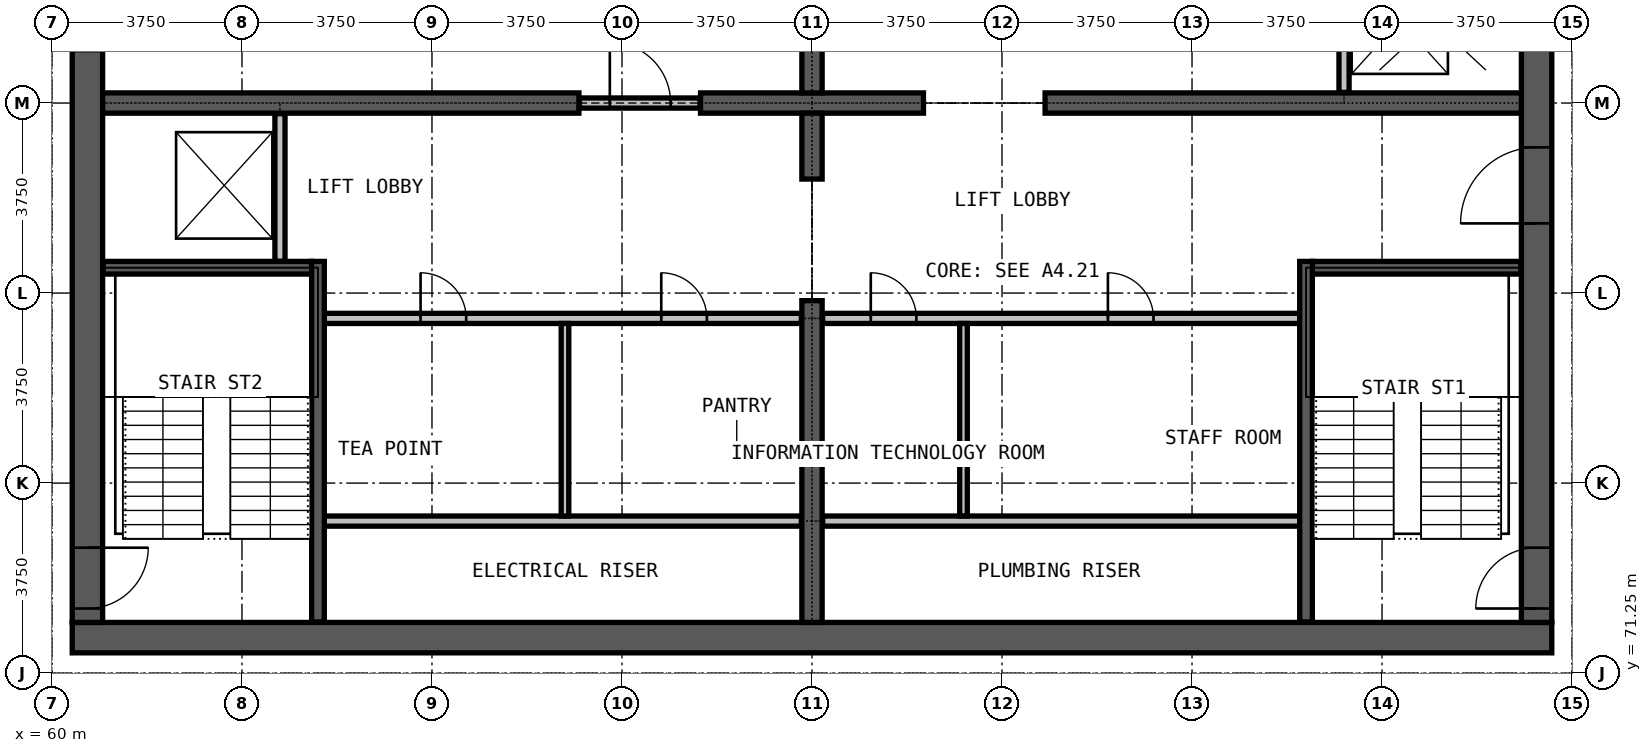
"""IFC4 building model, lengths in metres.
Left out: names, types, materials, properties, quantities, classifications, styles, units other than length and angle.
Written with IfcOpenShell. Run it as: python <this file> out.ifc"""

import sys

from ifc_helpers import new_model, si_unit, direction, frame, frame_2d, origin, place, context, subcontext, project, spatial, rectangle, extrude, element, fill, save


model = new_model("IFC4")
c1 = context("Model", 3, precision=1e-05, world=origin(), true_north=direction((0.0, 1.0)))
c2 = subcontext(c1, "Body", "Model", "MODEL_VIEW")
j1 = project(units=[si_unit("LENGTHUNIT", "METRE"), si_unit("PLANEANGLEUNIT", "RADIAN")], contexts=[c1])
p1 = place(None, origin())
s1 = spatial("IfcSite", under=j1, at=p1, CompositionType="ELEMENT")
p2 = place(p1, origin())
s2 = spatial("IfcBuilding", under=s1, at=p2, CompositionType="ELEMENT")
p3 = place(p2, frame((0.0, 0.0, 217.5)))
s3 = spatial("IfcBuildingStorey", under=s2, at=p3, CompositionType="ELEMENT", Elevation=217.5)
p4 = place(p3, frame((60.4, 71.95, 0.0), z_axis=(0.0, 0.0, 1.0), x_axis=(1.0, 0.0, 0.0)))
e1 = element("IfcWall", 1, at=p4, inside=s3, PredefinedType="SHEAR", context=c2, shape_type="SweptSolid", body=[
    extrude(rectangle(XDim=29.2, YDim=0.6, at=frame_2d((14.6, 0.0))), origin(), (0.0, 0.0, 1.0), 3.6),
])
p5 = place(p3, frame((89.3, 72.25, 0.0), z_axis=(0.0, 0.0, 1.0), x_axis=(0.0, 1.0, 0.0)))
e2 = element("IfcWall", 2, at=p5, inside=s3, PredefinedType="SHEAR", context=c2, shape_type="SweptSolid", body=[
    extrude(rectangle(XDim=20.5, YDim=0.6, at=frame_2d((10.25, 0.0))), origin(), (0.0, 0.0, 1.0), 3.6),
])
p6 = place(p5, frame((0.275, 0.0, 0.0)))
e3 = element("IfcOpeningElement", 3, at=p6, cuts=e2, PredefinedType="OPENING", context=c2, shape_type="SweptSolid", body=[
    extrude(rectangle(XDim=1.2, YDim=2.2, at=frame_2d((0.6, 1.1))), frame((0.0, 0.31, 0.0), z_axis=(0.0, -1.0, 0.0), x_axis=(1.0, 0.0, 0.0)), (0.0, 0.0, 1.0), 0.62),
])
p7 = place(p5, frame((13.775, 0.0, 0.0)))
e4 = element("IfcOpeningElement", 4, at=p7, cuts=e2, PredefinedType="OPENING", context=c2, shape_type="SweptSolid", body=[
    extrude(rectangle(XDim=1.2, YDim=2.2, at=frame_2d((0.6, 1.1))), frame((0.0, 0.31, 0.0), z_axis=(0.0, -1.0, 0.0), x_axis=(1.0, 0.0, 0.0)), (0.0, 0.0, 1.0), 0.62),
])
p8 = place(p5, frame((7.875, 0.0, 0.0)))
e5 = element("IfcOpeningElement", 5, at=p8, cuts=e2, PredefinedType="OPENING", context=c2, shape_type="SweptSolid", body=[
    extrude(rectangle(XDim=1.5, YDim=2.2, at=frame_2d((0.75, 1.1))), frame((0.0, 0.31, 0.0), z_axis=(0.0, -1.0, 0.0), x_axis=(1.0, 0.0, 0.0)), (0.0, 0.0, 1.0), 0.62),
])
p9 = place(p3, frame((60.7, 92.75, 0.0), z_axis=(0.0, 0.0, 1.0), x_axis=(0.0, -1.0, 0.0)))
e6 = element("IfcWall", 6, at=p9, inside=s3, PredefinedType="SHEAR", context=c2, shape_type="SweptSolid", body=[
    extrude(rectangle(XDim=20.5, YDim=0.6, at=frame_2d((10.25, 0.0))), origin(), (0.0, 0.0, 1.0), 3.6),
])
p10 = place(p9, frame((19.025, 0.0, 0.0)))
e7 = element("IfcOpeningElement", 7, at=p10, cuts=e6, PredefinedType="OPENING", context=c2, shape_type="SweptSolid", body=[
    extrude(rectangle(XDim=1.2, YDim=2.2, at=frame_2d((0.6, 1.1))), frame((0.0, 0.31, 0.0), z_axis=(0.0, -1.0, 0.0), x_axis=(1.0, 0.0, 0.0)), (0.0, 0.0, 1.0), 0.62),
])
p11 = place(p9, frame((8.025, 0.0, 0.0)))
e8 = element("IfcOpeningElement", 8, at=p11, cuts=e6, PredefinedType="OPENING", context=c2, shape_type="SweptSolid", body=[
    extrude(rectangle(XDim=1.2, YDim=2.2, at=frame_2d((0.6, 1.1))), frame((0.0, 0.31, 0.0), z_axis=(0.0, -1.0, 0.0), x_axis=(1.0, 0.0, 0.0)), (0.0, 0.0, 1.0), 0.62),
])
p12 = place(p3, frame((61.0, 82.5, 0.0), z_axis=(0.0, 0.0, 1.0), x_axis=(1.0, 0.0, 0.0)))
e9 = element("IfcWall", 9, at=p12, inside=s3, PredefinedType="SHEAR", context=c2, shape_type="SweptSolid", body=[
    extrude(rectangle(XDim=9.4, YDim=0.4, at=frame_2d((4.7, 0.0))), origin(), (0.0, 0.0, 1.0), 3.6),
])
p13 = place(p3, frame((72.8, 82.5, 0.0), z_axis=(0.0, 0.0, 1.0), x_axis=(1.0, 0.0, 0.0)))
e10 = element("IfcWall", 10, at=p13, inside=s3, PredefinedType="SHEAR", context=c2, shape_type="SweptSolid", body=[
    extrude(rectangle(XDim=4.4, YDim=0.4, at=frame_2d((2.2, 0.0))), origin(), (0.0, 0.0, 1.0), 3.6),
])
p14 = place(p3, frame((79.6, 82.5, 0.0), z_axis=(0.0, 0.0, 1.0), x_axis=(1.0, 0.0, 0.0)))
e11 = element("IfcWall", 11, at=p14, inside=s3, PredefinedType="SHEAR", context=c2, shape_type="SweptSolid", body=[
    extrude(rectangle(XDim=9.4, YDim=0.4, at=frame_2d((4.7, 0.0))), origin(), (0.0, 0.0, 1.0), 3.6),
])
p15 = place(p3, frame((75.0, 72.25, 0.0), z_axis=(0.0, 0.0, 1.0), x_axis=(0.0, 1.0, 0.0)))
e12 = element("IfcWall", 12, at=p15, inside=s3, PredefinedType="SHEAR", context=c2, shape_type="SweptSolid", body=[
    extrude(rectangle(XDim=6.35, YDim=0.4, at=frame_2d((3.175, 0.0))), origin(), (0.0, 0.0, 1.0), 3.6),
])
for number, where, z_axis, x_axis in (
    (13, (75.0, 81.0, 0.0), (0.0, 0.0, 1.0), (0.0, 1.0, 0.0)),
    (14, (75.0, 82.7, 0.0), (0.0, 0.0, 1.0), (0.0, 1.0, 0.0)),
):
    element("IfcWall", number, at=place(p3, frame(where, z_axis=z_axis, x_axis=x_axis)), inside=s3, PredefinedType="SHEAR", context=c2, shape_type="SweptSolid", body=[
        extrude(rectangle(XDim=1.3, YDim=0.4, at=frame_2d((0.65, 0.0))), origin(), (0.0, 0.0, 1.0), 3.6),
    ])
for number, where, z_axis, x_axis in (
    (15, (65.375, 74.25, 0.0), (0.0, 0.0, 1.0), (1.0, 0.0, 0.0)),
    (16, (75.21, 74.25, 0.0), (0.0, 0.0, 1.0), (1.0, 0.0, 0.0)),
):
    element("IfcWall", number, at=place(p3, frame(where, z_axis=z_axis, x_axis=x_axis)), inside=s3, PredefinedType="PARTITIONING", context=c2, shape_type="SweptSolid", body=[
        extrude(rectangle(XDim=9.415, YDim=0.2, at=frame_2d((4.708, 0.0))), origin(), (0.0, 0.0, 1.0), 3.3),
    ])
p16 = place(p3, frame((65.375, 78.25, 0.0), z_axis=(0.0, 0.0, 1.0), x_axis=(1.0, 0.0, 0.0)))
e17 = element("IfcWall", 17, at=p16, inside=s3, PredefinedType="PARTITIONING", context=c2, shape_type="SweptSolid", body=[
    extrude(rectangle(XDim=9.415, YDim=0.2, at=frame_2d((4.708, 0.0))), origin(), (0.0, 0.0, 1.0), 3.3),
])
p17 = place(p16, frame((1.9, 0.0, 0.0)))
e18 = element("IfcOpeningElement", 18, at=p17, cuts=e17, PredefinedType="OPENING", context=c2, shape_type="SweptSolid", body=[
    extrude(rectangle(XDim=0.9, YDim=2.2, at=frame_2d((0.45, 1.1))), frame((0.0, 0.11, 0.0), z_axis=(0.0, -1.0, 0.0), x_axis=(1.0, 0.0, 0.0)), (0.0, 0.0, 1.0), 0.22),
])
p18 = place(p16, frame((6.65, 0.0, 0.0)))
e19 = element("IfcOpeningElement", 19, at=p18, cuts=e17, PredefinedType="OPENING", context=c2, shape_type="SweptSolid", body=[
    extrude(rectangle(XDim=0.9, YDim=2.2, at=frame_2d((0.45, 1.1))), frame((0.0, 0.11, 0.0), z_axis=(0.0, -1.0, 0.0), x_axis=(1.0, 0.0, 0.0)), (0.0, 0.0, 1.0), 0.22),
])
p19 = place(p3, frame((75.21, 78.25, 0.0), z_axis=(0.0, 0.0, 1.0), x_axis=(1.0, 0.0, 0.0)))
e20 = element("IfcWall", 20, at=p19, inside=s3, PredefinedType="PARTITIONING", context=c2, shape_type="SweptSolid", body=[
    extrude(rectangle(XDim=9.415, YDim=0.2, at=frame_2d((4.708, 0.0))), origin(), (0.0, 0.0, 1.0), 3.3),
])
p20 = place(p19, frame((0.95, 0.0, 0.0)))
e21 = element("IfcOpeningElement", 21, at=p20, cuts=e20, PredefinedType="OPENING", context=c2, shape_type="SweptSolid", body=[
    extrude(rectangle(XDim=0.9, YDim=2.2, at=frame_2d((0.45, 1.1))), frame((0.0, 0.11, 0.0), z_axis=(0.0, -1.0, 0.0), x_axis=(1.0, 0.0, 0.0)), (0.0, 0.0, 1.0), 0.22),
])
p21 = place(p19, frame((5.63, 0.0, 0.0)))
e22 = element("IfcOpeningElement", 22, at=p21, cuts=e20, PredefinedType="OPENING", context=c2, shape_type="SweptSolid", body=[
    extrude(rectangle(XDim=0.9, YDim=2.2, at=frame_2d((0.45, 1.1))), frame((0.0, 0.11, 0.0), z_axis=(0.0, -1.0, 0.0), x_axis=(1.0, 0.0, 0.0)), (0.0, 0.0, 1.0), 0.22),
])
p22 = place(p3, frame((70.41, 82.5, 0.0), z_axis=(0.0, 0.0, 1.0), x_axis=(1.0, 0.0, 0.0)))
e23 = element("IfcWall", 23, at=p22, inside=s3, PredefinedType="PARTITIONING", context=c2, shape_type="SweptSolid", body=[
    extrude(rectangle(XDim=2.38, YDim=0.2, at=frame_2d((1.19, 0.0))), origin(), (0.0, 0.0, 1.0), 2.4),
])
p23 = place(p22, frame((0.6, 0.0, 0.0)))
e24 = element("IfcOpeningElement", 24, at=p23, cuts=e23, PredefinedType="OPENING", context=c2, shape_type="SweptSolid", body=[
    extrude(rectangle(XDim=1.2, YDim=2.2, at=frame_2d((0.6, 1.1))), frame((0.0, 0.11, 0.0), z_axis=(0.0, -1.0, 0.0), x_axis=(1.0, 0.0, 0.0)), (0.0, 0.0, 1.0), 0.22),
])
for number, where, z_axis, x_axis in (
    (25, (70.125, 74.35, 0.0), (0.0, 0.0, 1.0), (0.0, 1.0, 0.0)),
    (26, (77.99, 74.35, 0.0), (0.0, 0.0, 1.0), (0.0, 1.0, 0.0)),
):
    element("IfcWall", number, at=place(p3, frame(where, z_axis=z_axis, x_axis=x_axis)), inside=s3, PredefinedType="PARTITIONING", context=c2, shape_type="SweptSolid", body=[
        extrude(rectangle(XDim=3.8, YDim=0.15, at=frame_2d((1.9, 0.0))), origin(), (0.0, 0.0, 1.0), 3.3),
    ])
p24 = place(p3, frame((64.5, 79.375, 0.0), z_axis=(0.0, 0.0, 1.0), x_axis=(0.0, 1.0, 0.0)))
e27 = element("IfcWall", 27, at=p24, inside=s3, PredefinedType="PARTITIONING", context=c2, shape_type="SweptSolid", body=[
    extrude(rectangle(XDim=2.915, YDim=0.2, at=frame_2d((1.458, 0.0))), origin(), (0.0, 0.0, 1.0), 3.3),
])
p25 = place(p3, frame((85.5, 82.71, 0.0), z_axis=(0.0, 0.0, 1.0), x_axis=(0.0, 1.0, 0.0)))
e28 = element("IfcWall", 28, at=p25, inside=s3, PredefinedType="PARTITIONING", context=c2, shape_type="SweptSolid", body=[
    extrude(rectangle(XDim=2.915, YDim=0.2, at=frame_2d((1.458, 0.0))), origin(), (0.0, 0.0, 1.0), 3.3),
])
p26 = place(p25, frame((0.9, 0.0, 0.0)))
e29 = element("IfcOpeningElement", 29, at=p26, cuts=e28, PredefinedType="OPENING", context=c2, shape_type="SweptSolid", body=[
    extrude(rectangle(XDim=1.1, YDim=2.2, at=frame_2d((0.55, 1.1))), frame((0.0, 0.11, 0.0), z_axis=(0.0, -1.0, 0.0), x_axis=(1.0, 0.0, 0.0)), (0.0, 0.0, 1.0), 0.22),
])
for number, where, z_axis, x_axis in (
    (30, (61.01, 79.25, 0.0), (0.0, 0.0, 1.0), (1.0, 0.0, 0.0)),
    (31, (84.875, 79.25, 0.0), (0.0, 0.0, 1.0), (1.0, 0.0, 0.0)),
):
    element("IfcWall", number, at=place(p3, frame(where, z_axis=z_axis, x_axis=x_axis)), inside=s3, PredefinedType="PARTITIONING", context=c2, shape_type="SweptSolid", body=[
        extrude(rectangle(XDim=4.115, YDim=0.25, at=frame_2d((2.058, 0.0))), origin(), (0.0, 0.0, 1.0), 3.3),
    ])
for number, where, z_axis, x_axis in (
    (32, (65.25, 72.26, 0.0), (0.0, 0.0, 1.0), (0.0, 1.0, 0.0)),
    (33, (84.75, 72.26, 0.0), (0.0, 0.0, 1.0), (0.0, 1.0, 0.0)),
):
    element("IfcWall", number, at=place(p3, frame(where, z_axis=z_axis, x_axis=x_axis)), inside=s3, PredefinedType="PARTITIONING", context=c2, shape_type="SweptSolid", body=[
        extrude(rectangle(XDim=7.115, YDim=0.25, at=frame_2d((3.558, 0.0))), origin(), (0.0, 0.0, 1.0), 3.3),
    ])
p27 = place(p23, origin())
e34 = element("IfcDoor", 34, at=p27, inside=s3, OperationType="SINGLE_SWING_LEFT", PredefinedType="DOOR", context=c2, shape_type="SweptSolid", body=[
    extrude(rectangle(XDim=1.2, YDim=2.2, at=frame_2d((0.6, 1.1))), frame((0.0, 0.025, 0.0), z_axis=(0.0, -1.0, 0.0), x_axis=(1.0, 0.0, 0.0)), (0.0, 0.0, 1.0), 0.05),
])
fill(e24, e34)
p28 = place(p6, origin())
e35 = element("IfcDoor", 35, at=p28, inside=s3, OperationType="SINGLE_SWING_LEFT", PredefinedType="DOOR", context=c2, shape_type="SweptSolid", body=[
    extrude(rectangle(XDim=1.2, YDim=2.2, at=frame_2d((0.6, 1.1))), frame((0.0, 0.025, 0.0), z_axis=(0.0, -1.0, 0.0), x_axis=(1.0, 0.0, 0.0)), (0.0, 0.0, 1.0), 0.05),
])
fill(e3, e35)
p29 = place(p10, origin())
e36 = element("IfcDoor", 36, at=p29, inside=s3, OperationType="SINGLE_SWING_LEFT", PredefinedType="DOOR", context=c2, shape_type="SweptSolid", body=[
    extrude(rectangle(XDim=1.2, YDim=2.2, at=frame_2d((0.6, 1.1))), frame((0.0, 0.025, 0.0), z_axis=(0.0, -1.0, 0.0), x_axis=(1.0, 0.0, 0.0)), (0.0, 0.0, 1.0), 0.05),
])
fill(e7, e36)
p30 = place(p8, origin())
e37 = element("IfcDoor", 37, at=p30, inside=s3, OperationType="DOUBLE_DOOR_SINGLE_SWING", PredefinedType="DOOR", context=c2, shape_type="SweptSolid", body=[
    extrude(rectangle(XDim=1.5, YDim=2.2, at=frame_2d((0.75, 1.1))), frame((0.0, 0.025, 0.0), z_axis=(0.0, -1.0, 0.0), x_axis=(1.0, 0.0, 0.0)), (0.0, 0.0, 1.0), 0.05),
])
fill(e5, e37)
p31 = place(p17, origin())
e38 = element("IfcDoor", 38, at=p31, inside=s3, OperationType="SINGLE_SWING_LEFT", PredefinedType="DOOR", context=c2, shape_type="SweptSolid", body=[
    extrude(rectangle(XDim=0.9, YDim=2.2, at=frame_2d((0.45, 1.1))), frame((0.0, 0.025, 0.0), z_axis=(0.0, -1.0, 0.0), x_axis=(1.0, 0.0, 0.0)), (0.0, 0.0, 1.0), 0.05),
])
fill(e18, e38)
p32 = place(p18, origin())
e39 = element("IfcDoor", 39, at=p32, inside=s3, OperationType="SINGLE_SWING_LEFT", PredefinedType="DOOR", context=c2, shape_type="SweptSolid", body=[
    extrude(rectangle(XDim=0.9, YDim=2.2, at=frame_2d((0.45, 1.1))), frame((0.0, 0.025, 0.0), z_axis=(0.0, -1.0, 0.0), x_axis=(1.0, 0.0, 0.0)), (0.0, 0.0, 1.0), 0.05),
])
fill(e19, e39)
p33 = place(p20, origin())
e40 = element("IfcDoor", 40, at=p33, inside=s3, OperationType="SINGLE_SWING_LEFT", PredefinedType="DOOR", context=c2, shape_type="SweptSolid", body=[
    extrude(rectangle(XDim=0.9, YDim=2.2, at=frame_2d((0.45, 1.1))), frame((0.0, 0.025, 0.0), z_axis=(0.0, -1.0, 0.0), x_axis=(1.0, 0.0, 0.0)), (0.0, 0.0, 1.0), 0.05),
])
fill(e21, e40)
p34 = place(p21, origin())
e41 = element("IfcDoor", 41, at=p34, inside=s3, OperationType="SINGLE_SWING_LEFT", PredefinedType="DOOR", context=c2, shape_type="SweptSolid", body=[
    extrude(rectangle(XDim=0.9, YDim=2.2, at=frame_2d((0.45, 1.1))), frame((0.0, 0.025, 0.0), z_axis=(0.0, -1.0, 0.0), x_axis=(1.0, 0.0, 0.0)), (0.0, 0.0, 1.0), 0.05),
])
fill(e22, e41)
save(model, sys.argv[1])
